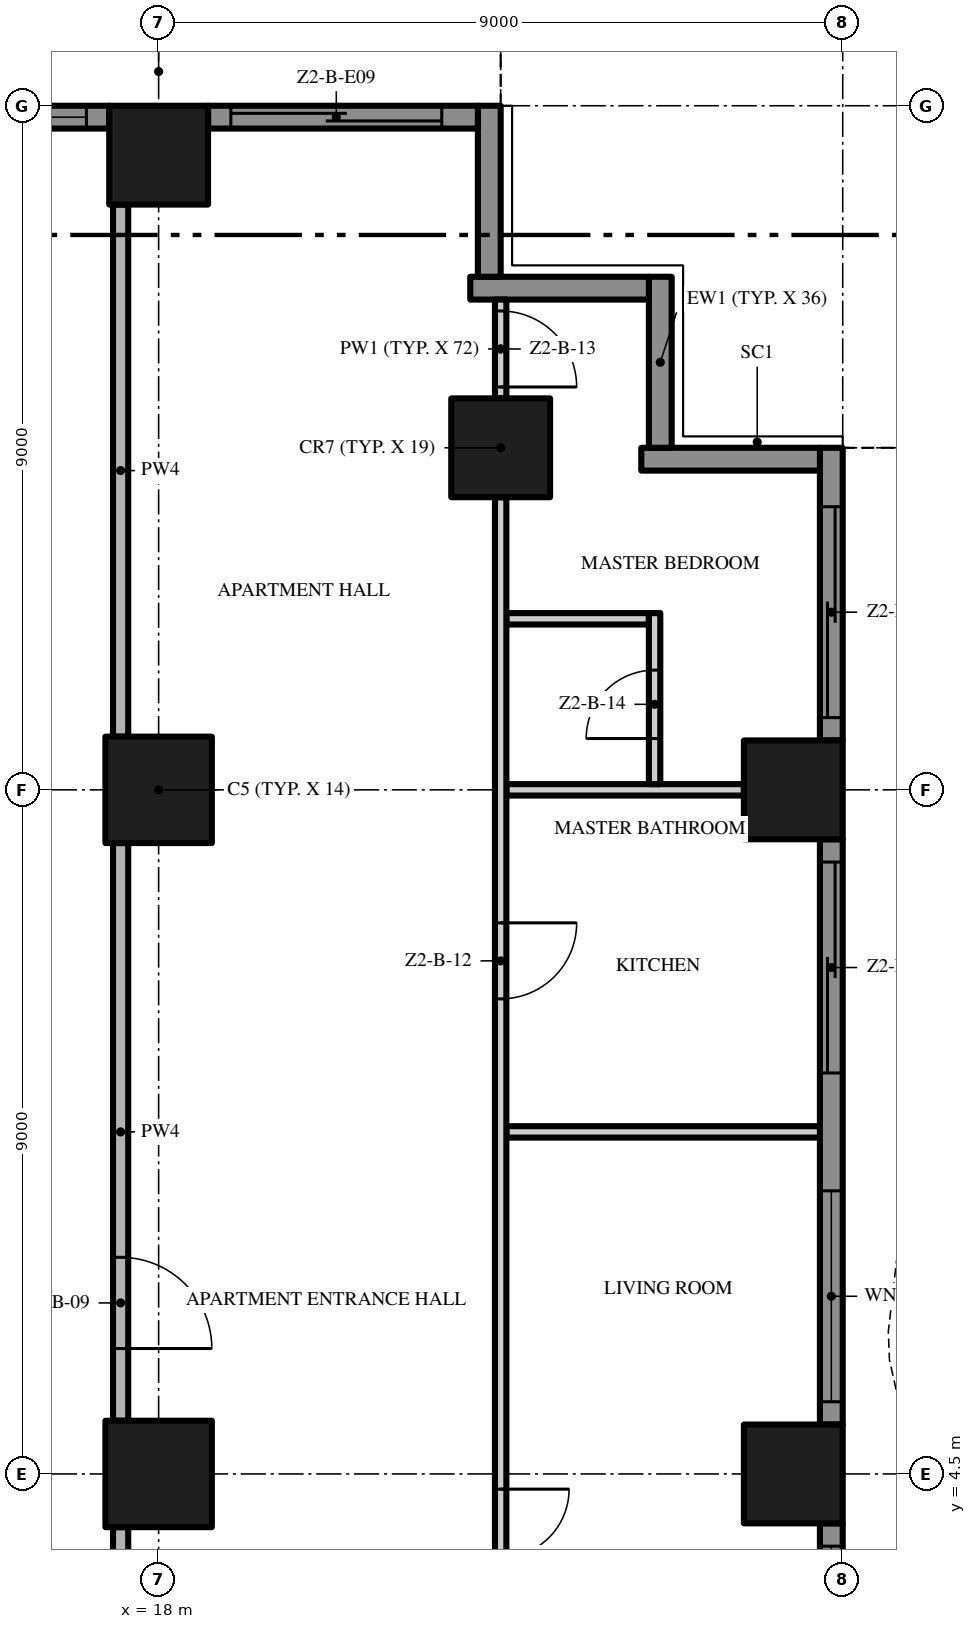
"""IFC4 building model, lengths in metres.
Left out: names, types, materials, properties, quantities, classifications, styles, units other than length and angle.
Written with IfcOpenShell. Run it as: python <this file> out.ifc"""

import sys

from ifc_helpers import new_model, si_unit, direction, frame, frame_2d, origin, origin_2d, place, context, subcontext, project, spatial, polyline, rectangle, outline, extrude, element, fill, save


model = new_model("IFC4")
c1 = context("Model", 3, precision=1e-05, world=origin(), true_north=direction((0.0, 1.0)))
c2 = subcontext(c1, "Body", "Model", "MODEL_VIEW")
j1 = project(units=[si_unit("LENGTHUNIT", "METRE"), si_unit("PLANEANGLEUNIT", "RADIAN")], contexts=[c1])
p1 = place(None, origin())
s1 = spatial("IfcSite", under=j1, at=p1, CompositionType="ELEMENT")
p2 = place(p1, origin())
s2 = spatial("IfcBuilding", under=s1, at=p2, CompositionType="ELEMENT")
p3 = place(p2, frame((0.0, 0.0, 80.8)))
s3 = spatial("IfcBuildingStorey", under=s2, at=p3, CompositionType="ELEMENT", Elevation=80.8)
p4 = place(p3, frame((18.0, 13.5, 0.0), z_axis=(0.0, 0.0, 1.0), x_axis=(1.0, 0.0, 0.0)))
e1 = element("IfcColumn", 1, at=p4, inside=s3, PredefinedType="COLUMN", context=c2, shape_type="SweptSolid", body=[
    extrude(rectangle(XDim=1.4, YDim=1.4, at=origin_2d()), origin(), (0.0, 0.0, 1.0), 3.5),
])
p5 = place(p3, frame((18.0, 21.85, 0.0), z_axis=(0.0, 0.0, 1.0), x_axis=(1.0, 0.0, 0.0)))
e2 = element("IfcColumn", 2, at=p5, inside=s3, PredefinedType="COLUMN", context=c2, shape_type="SweptSolid", body=[
    extrude(rectangle(XDim=1.3, YDim=1.3, at=origin_2d()), origin(), (0.0, 0.0, 1.0), 3.5),
])
p6 = place(p3, frame((18.0, 4.5, 0.0), z_axis=(0.0, 0.0, 1.0), x_axis=(1.0, 0.0, 0.0)))
e3 = element("IfcColumn", 3, at=p6, inside=s3, PredefinedType="COLUMN", context=c2, shape_type="SweptSolid", body=[
    extrude(rectangle(XDim=1.4, YDim=1.4, at=origin_2d()), origin(), (0.0, 0.0, 1.0), 3.5),
])
for number, where, z_axis, x_axis in (
    (4, (26.35, 13.5, 0.0), (0.0, 0.0, 1.0), (1.0, 0.0, 0.0)),
    (5, (22.5, 18.0, 0.0), (0.0, 0.0, 1.0), (1.0, 0.0, 0.0)),
    (6, (26.35, 4.5, 0.0), (0.0, 0.0, 1.0), (1.0, 0.0, 0.0)),
):
    element("IfcColumn", number, at=place(p3, frame(where, z_axis=z_axis, x_axis=x_axis)), inside=s3, PredefinedType="COLUMN", context=c2, shape_type="SweptSolid", body=[
        extrude(rectangle(XDim=1.3, YDim=1.3, at=origin_2d()), origin(), (0.0, 0.0, 1.0), 3.5),
    ])
p7 = place(p3, frame((26.85, 3.85, 0.0), z_axis=(0.0, 0.0, 1.0), x_axis=(0.0, -1.0, 0.0)))
e7 = element("IfcWall", 7, at=p7, inside=s3, PredefinedType="SOLIDWALL", context=c2, shape_type="SweptSolid", body=[
    extrude(rectangle(XDim=7.7, YDim=0.3, at=frame_2d((3.85, 0.0))), origin(), (0.0, 0.0, 1.0), 3.5),
])
p8 = place(p7, frame((4.625, 0.0, 0.0)))
e8 = element("IfcOpeningElement", 8, at=p8, cuts=e7, PredefinedType="OPENING", context=c2, shape_type="SweptSolid", body=[
    extrude(rectangle(XDim=2.775, YDim=2.4, at=frame_2d((1.387, 1.2))), frame((0.0, 0.16, 0.0), z_axis=(0.0, -1.0, 0.0), x_axis=(1.0, 0.0, 0.0)), (0.0, 0.0, 1.0), 0.32),
])
p9 = place(p7, frame((0.3, 0.0, 0.45)))
e9 = element("IfcOpeningElement", 9, at=p9, cuts=e7, PredefinedType="OPENING", context=c2, shape_type="SweptSolid", body=[
    extrude(rectangle(XDim=2.775, YDim=2.65, at=frame_2d((1.387, 1.325))), frame((0.0, 0.16, 0.0), z_axis=(0.0, -1.0, 0.0), x_axis=(1.0, 0.0, 0.0)), (0.0, 0.0, 1.0), 0.32),
])
p10 = place(p3, frame((26.85, 12.85, 0.0), z_axis=(0.0, 0.0, 1.0), x_axis=(0.0, -1.0, 0.0)))
e10 = element("IfcWall", 10, at=p10, inside=s3, PredefinedType="SOLIDWALL", context=c2, shape_type="SweptSolid", body=[
    extrude(rectangle(XDim=7.7, YDim=0.3, at=frame_2d((3.85, 0.0))), origin(), (0.0, 0.0, 1.0), 3.5),
])
p11 = place(p10, frame((4.625, 0.0, 0.45)))
e11 = element("IfcOpeningElement", 11, at=p11, cuts=e10, PredefinedType="OPENING", context=c2, shape_type="SweptSolid", body=[
    extrude(rectangle(XDim=2.775, YDim=2.65, at=frame_2d((1.387, 1.325))), frame((0.0, 0.16, 0.0), z_axis=(0.0, -1.0, 0.0), x_axis=(1.0, 0.0, 0.0)), (0.0, 0.0, 1.0), 0.32),
])
p12 = place(p10, frame((0.3, 0.0, 0.0)))
e12 = element("IfcOpeningElement", 12, at=p12, cuts=e10, PredefinedType="OPENING", context=c2, shape_type="SweptSolid", body=[
    extrude(rectangle(XDim=2.775, YDim=2.4, at=frame_2d((1.387, 1.2))), frame((0.0, 0.16, 0.0), z_axis=(0.0, -1.0, 0.0), x_axis=(1.0, 0.0, 0.0)), (0.0, 0.0, 1.0), 0.32),
])
p13 = place(p3, frame((26.85, 18.0, 0.0), z_axis=(0.0, 0.0, 1.0), x_axis=(0.0, -1.0, 0.0)))
e13 = element("IfcWall", 13, at=p13, inside=s3, PredefinedType="SOLIDWALL", context=c2, shape_type="SweptSolid", body=[
    extrude(rectangle(XDim=3.85, YDim=0.3, at=frame_2d((1.925, 0.0))), origin(), (0.0, 0.0, 1.0), 3.5),
])
p14 = place(p13, frame((0.775, 0.0, 0.0)))
e14 = element("IfcOpeningElement", 14, at=p14, cuts=e13, PredefinedType="OPENING", context=c2, shape_type="SweptSolid", body=[
    extrude(rectangle(XDim=2.775, YDim=2.4, at=frame_2d((1.387, 1.2))), frame((0.0, 0.16, 0.0), z_axis=(0.0, -1.0, 0.0), x_axis=(1.0, 0.0, 0.0)), (0.0, 0.0, 1.0), 0.32),
])
p15 = place(p3, frame((24.35, 17.85, 0.0), z_axis=(0.0, 0.0, 1.0), x_axis=(1.0, 0.0, 0.0)))
e15 = element("IfcWall", 15, at=p15, inside=s3, PredefinedType="SOLIDWALL", context=c2, shape_type="SweptSolid", body=[
    extrude(rectangle(XDim=2.35, YDim=0.3, at=frame_2d((1.175, 0.0))), origin(), (0.0, 0.0, 1.0), 3.5),
])
p16 = place(p3, frame((24.6, 20.25, 0.0), z_axis=(0.0, 0.0, 1.0), x_axis=(0.0, -1.0, 0.0)))
e16 = element("IfcWall", 16, at=p16, inside=s3, PredefinedType="SOLIDWALL", context=c2, shape_type="SweptSolid", body=[
    extrude(rectangle(XDim=2.25, YDim=0.3, at=frame_2d((1.125, 0.0))), origin(), (0.0, 0.0, 1.0), 3.5),
])
p17 = place(p3, frame((22.1, 20.1, 0.0), z_axis=(0.0, 0.0, 1.0), x_axis=(1.0, 0.0, 0.0)))
e17 = element("IfcWall", 17, at=p17, inside=s3, PredefinedType="SOLIDWALL", context=c2, shape_type="SweptSolid", body=[
    extrude(rectangle(XDim=2.35, YDim=0.3, at=frame_2d((1.175, 0.0))), origin(), (0.0, 0.0, 1.0), 3.5),
])
p18 = place(p3, frame((22.35, 22.5, 0.0), z_axis=(0.0, 0.0, 1.0), x_axis=(0.0, -1.0, 0.0)))
e18 = element("IfcWall", 18, at=p18, inside=s3, PredefinedType="SOLIDWALL", context=c2, shape_type="SweptSolid", body=[
    extrude(rectangle(XDim=2.25, YDim=0.3, at=frame_2d((1.125, 0.0))), origin(), (0.0, 0.0, 1.0), 3.5),
])
p19 = place(p3, frame((18.65, 22.35, 0.0), z_axis=(0.0, 0.0, 1.0), x_axis=(1.0, 0.0, 0.0)))
e19 = element("IfcWall", 19, at=p19, inside=s3, PredefinedType="SOLIDWALL", context=c2, shape_type="SweptSolid", body=[
    extrude(rectangle(XDim=3.55, YDim=0.3, at=frame_2d((1.775, 0.0))), origin(), (0.0, 0.0, 1.0), 3.5),
])
p20 = place(p19, frame((0.3, 0.0, 0.0)))
e20 = element("IfcOpeningElement", 20, at=p20, cuts=e19, PredefinedType="OPENING", context=c2, shape_type="SweptSolid", body=[
    extrude(rectangle(XDim=2.775, YDim=2.4, at=frame_2d((1.387, 1.2))), frame((0.0, 0.16, 0.0), z_axis=(0.0, -1.0, 0.0), x_axis=(1.0, 0.0, 0.0)), (0.0, 0.0, 1.0), 0.32),
])
p21 = place(p3, frame((13.5, 22.35, 0.0), z_axis=(0.0, 0.0, 1.0), x_axis=(1.0, 0.0, 0.0)))
e21 = element("IfcWall", 21, at=p21, inside=s3, PredefinedType="SOLIDWALL", context=c2, shape_type="SweptSolid", body=[
    extrude(rectangle(XDim=3.85, YDim=0.3, at=frame_2d((1.925, 0.0))), origin(), (0.0, 0.0, 1.0), 3.5),
])
p22 = place(p21, frame((0.775, 0.0, 0.45)))
e22 = element("IfcOpeningElement", 22, at=p22, cuts=e21, PredefinedType="OPENING", context=c2, shape_type="SweptSolid", body=[
    extrude(rectangle(XDim=2.775, YDim=2.65, at=frame_2d((1.387, 1.325))), frame((0.0, 0.16, 0.0), z_axis=(0.0, -1.0, 0.0), x_axis=(1.0, 0.0, 0.0)), (0.0, 0.0, 1.0), 0.32),
])
p23 = place(p3, origin())
e23 = element("IfcWall", 23, at=p23, inside=s3, PredefinedType="USERDEFINED", context=c2, shape_type="SweptSolid", body=[
    extrude(outline(polyline([(29.649, -18.0), (29.985, -16.5), (30.0, -16.125), (29.869, -15.0), (29.345, -13.5), (28.612, -12.0), (27.951, -10.5), (27.615, -9.0), (27.6, -8.625), (27.731, -7.5), (28.255, -6.0), (28.988, -4.5), (29.649, -3.0), (29.985, -1.5), (30.0, -1.125), (29.869, 0.0), (29.345, 1.5), (28.612, 3.0), (27.951, 4.5), (27.615, 6.0), (27.6, 6.375), (27.731, 7.5), (28.255, 9.0), (28.988, 10.5), (29.649, 12.0), (29.985, 13.5), (30.0, 13.875), (29.869, 15.0), (29.345, 16.5), (28.612, 18.0), (28.388, 17.89), (29.114, 16.404), (29.624, 14.944), (29.749, 13.865), (29.736, 13.533), (29.41, 12.079), (28.761, 10.605), (28.024, 9.096), (27.486, 7.556), (27.349, 6.385), (27.366, 5.967), (27.713, 4.421), (28.385, 2.895), (29.114, 1.404), (29.624, -0.056), (29.749, -1.135), (29.736, -1.467), (29.41, -2.921), (28.761, -4.395), (28.024, -5.904), (27.486, -7.444), (27.349, -8.615), (27.366, -9.033), (27.713, -10.579), (28.385, -12.105), (29.114, -13.596), (29.624, -15.056), (29.749, -16.135), (29.736, -16.467), (29.405, -17.945), (29.649, -18.0)])), origin(), (0.0, 0.0, 1.0), 0.9),
])
p24 = place(p3, origin())
e24 = element("IfcWall", 24, at=p24, inside=s3, PredefinedType="USERDEFINED", context=c2, shape_type="SweptSolid", body=[
    extrude(outline(polyline([(22.5, 25.149), (21.0, 25.485), (20.625, 25.5), (19.5, 25.369), (18.0, 24.845), (16.5, 24.112), (15.0, 23.451), (13.5, 23.115), (13.555, 22.871), (15.079, 23.213), (16.605, 23.885), (18.096, 24.614), (19.556, 25.124), (20.635, 25.249), (20.967, 25.236), (22.445, 24.905), (22.5, 25.149)])), origin(), (0.0, 0.0, 1.0), 0.9),
])
p25 = place(p3, frame((22.575, 9.0, 0.0), z_axis=(0.0, 0.0, 1.0), x_axis=(1.0, 0.0, 0.0)))
e25 = element("IfcWall", 25, at=p25, inside=s3, PredefinedType="PARTITIONING", context=c2, shape_type="SweptSolid", body=[
    extrude(rectangle(XDim=4.125, YDim=0.15, at=frame_2d((2.062, 0.0))), origin(), (0.0, 0.0, 1.0), 3.5),
])
p26 = place(p3, frame((22.575, 13.5, 0.0), z_axis=(0.0, 0.0, 1.0), x_axis=(1.0, 0.0, 0.0)))
e26 = element("IfcWall", 26, at=p26, inside=s3, PredefinedType="PARTITIONING", context=c2, shape_type="SweptSolid", body=[
    extrude(rectangle(XDim=3.125, YDim=0.15, at=frame_2d((1.562, 0.0))), origin(), (0.0, 0.0, 1.0), 3.5),
])
p27 = place(p3, frame((22.575, 15.75, 0.0), z_axis=(0.0, 0.0, 1.0), x_axis=(1.0, 0.0, 0.0)))
e27 = element("IfcWall", 27, at=p27, inside=s3, PredefinedType="PARTITIONING", context=c2, shape_type="SweptSolid", body=[
    extrude(rectangle(XDim=1.875, YDim=0.15, at=frame_2d((0.938, 0.0))), origin(), (0.0, 0.0, 1.0), 3.5),
])
p28 = place(p3, frame((17.5, -0.2, 0.0), z_axis=(0.0, 0.0, 1.0), x_axis=(0.0, 1.0, 0.0)))
e28 = element("IfcWall", 28, at=p28, inside=s3, PredefinedType="PARTITIONING", context=c2, shape_type="SweptSolid", body=[
    extrude(rectangle(XDim=4.0, YDim=0.2, at=frame_2d((2.0, 0.0))), origin(), (0.0, 0.0, 1.0), 3.5),
])
p29 = place(p3, frame((17.5, 12.8, 0.0), z_axis=(0.0, 0.0, 1.0), x_axis=(0.0, -1.0, 0.0)))
e29 = element("IfcWall", 29, at=p29, inside=s3, PredefinedType="PARTITIONING", context=c2, shape_type="SweptSolid", body=[
    extrude(rectangle(XDim=7.6, YDim=0.2, at=frame_2d((3.8, 0.0))), origin(), (0.0, 0.0, 1.0), 3.5),
])
p30 = place(p29, frame((5.45, 0.0, 0.0)))
e30 = element("IfcOpeningElement", 30, at=p30, cuts=e29, PredefinedType="OPENING", context=c2, shape_type="SweptSolid", body=[
    extrude(rectangle(XDim=1.2, YDim=2.4, at=frame_2d((0.6, 1.2))), frame((0.0, 0.11, 0.0), z_axis=(0.0, -1.0, 0.0), x_axis=(1.0, 0.0, 0.0)), (0.0, 0.0, 1.0), 0.22),
])
p31 = place(p3, frame((17.5, 14.2, 0.0), z_axis=(0.0, 0.0, 1.0), x_axis=(0.0, 1.0, 0.0)))
e31 = element("IfcWall", 31, at=p31, inside=s3, PredefinedType="PARTITIONING", context=c2, shape_type="SweptSolid", body=[
    extrude(rectangle(XDim=7.0, YDim=0.2, at=frame_2d((3.5, 0.0))), origin(), (0.0, 0.0, 1.0), 3.5),
])
p32 = place(p3, frame((22.5, 17.35, 0.0), z_axis=(0.0, 0.0, 1.0), x_axis=(0.0, -1.0, 0.0)))
e32 = element("IfcWall", 32, at=p32, inside=s3, PredefinedType="PARTITIONING", context=c2, shape_type="SweptSolid", body=[
    extrude(rectangle(XDim=17.25, YDim=0.15, at=frame_2d((8.625, 0.0))), origin(), (0.0, 0.0, 1.0), 3.5),
])
p33 = place(p32, frame((13.05, 0.0, 0.0)))
e33 = element("IfcOpeningElement", 33, at=p33, cuts=e32, PredefinedType="OPENING", context=c2, shape_type="SweptSolid", body=[
    extrude(rectangle(XDim=1.8, YDim=2.4, at=frame_2d((0.9, 1.2))), frame((0.0, 0.085, 0.0), z_axis=(0.0, -1.0, 0.0), x_axis=(1.0, 0.0, 0.0)), (0.0, 0.0, 1.0), 0.17),
])
p34 = place(p32, frame((5.6, 0.0, 0.0)))
e34 = element("IfcOpeningElement", 34, at=p34, cuts=e32, PredefinedType="OPENING", context=c2, shape_type="SweptSolid", body=[
    extrude(rectangle(XDim=1.0, YDim=2.4, at=frame_2d((0.5, 1.2))), frame((0.0, 0.085, 0.0), z_axis=(0.0, -1.0, 0.0), x_axis=(1.0, 0.0, 0.0)), (0.0, 0.0, 1.0), 0.17),
])
p35 = place(p3, frame((22.5, 19.95, 0.0), z_axis=(0.0, 0.0, 1.0), x_axis=(0.0, -1.0, 0.0)))
e35 = element("IfcWall", 35, at=p35, inside=s3, PredefinedType="PARTITIONING", context=c2, shape_type="SweptSolid", body=[
    extrude(rectangle(XDim=1.3, YDim=0.15, at=frame_2d((0.65, 0.0))), origin(), (0.0, 0.0, 1.0), 3.5),
])
p36 = place(p35, frame((0.15, 0.0, 0.0)))
e36 = element("IfcOpeningElement", 36, at=p36, cuts=e35, PredefinedType="OPENING", context=c2, shape_type="SweptSolid", body=[
    extrude(rectangle(XDim=1.0, YDim=2.4, at=frame_2d((0.5, 1.2))), frame((0.0, 0.085, 0.0), z_axis=(0.0, -1.0, 0.0), x_axis=(1.0, 0.0, 0.0)), (0.0, 0.0, 1.0), 0.17),
])
p37 = place(p3, frame((24.525, 13.575, 0.0), z_axis=(0.0, 0.0, 1.0), x_axis=(0.0, 1.0, 0.0)))
e37 = element("IfcWall", 37, at=p37, inside=s3, PredefinedType="PARTITIONING", context=c2, shape_type="SweptSolid", body=[
    extrude(rectangle(XDim=2.25, YDim=0.15, at=frame_2d((1.125, 0.0))), origin(), (0.0, 0.0, 1.0), 3.5),
])
p38 = place(p37, frame((0.6, 0.0, 0.0)))
e38 = element("IfcOpeningElement", 38, at=p38, cuts=e37, PredefinedType="OPENING", context=c2, shape_type="SweptSolid", body=[
    extrude(rectangle(XDim=0.9, YDim=2.1, at=frame_2d((0.45, 1.05))), frame((0.0, 0.085, 0.0), z_axis=(0.0, -1.0, 0.0), x_axis=(1.0, 0.0, 0.0)), (0.0, 0.0, 1.0), 0.17),
])
p39 = place(p9, origin())
e39 = element("IfcWindow", 39, at=p39, inside=s3, PartitioningType="SINGLE_PANEL", PredefinedType="WINDOW", context=c2, shape_type="SweptSolid", body=[
    extrude(rectangle(XDim=2.775, YDim=2.65, at=frame_2d((1.387, 1.325))), frame((0.0, 0.03, 0.0), z_axis=(0.0, -1.0, 0.0), x_axis=(1.0, 0.0, 0.0)), (0.0, 0.0, 1.0), 0.06),
])
fill(e9, e39)
p40 = place(p11, origin())
e40 = element("IfcWindow", 40, at=p40, inside=s3, PartitioningType="SINGLE_PANEL", PredefinedType="WINDOW", context=c2, shape_type="SweptSolid", body=[
    extrude(rectangle(XDim=2.775, YDim=2.65, at=frame_2d((1.387, 1.325))), frame((0.0, 0.03, 0.0), z_axis=(0.0, -1.0, 0.0), x_axis=(1.0, 0.0, 0.0)), (0.0, 0.0, 1.0), 0.06),
])
fill(e11, e40)
p41 = place(p12, origin())
e41 = element("IfcDoor", 41, at=p41, inside=s3, OperationType="SINGLE_SWING_LEFT", PredefinedType="DOOR", context=c2, shape_type="SweptSolid", body=[
    extrude(rectangle(XDim=2.775, YDim=2.4, at=frame_2d((1.387, 1.2))), frame((0.0, 0.025, 0.0), z_axis=(0.0, -1.0, 0.0), x_axis=(1.0, 0.0, 0.0)), (0.0, 0.0, 1.0), 0.05),
])
fill(e12, e41)
p42 = place(p14, origin())
e42 = element("IfcDoor", 42, at=p42, inside=s3, OperationType="SINGLE_SWING_LEFT", PredefinedType="DOOR", context=c2, shape_type="SweptSolid", body=[
    extrude(rectangle(XDim=2.775, YDim=2.4, at=frame_2d((1.387, 1.2))), frame((0.0, 0.025, 0.0), z_axis=(0.0, -1.0, 0.0), x_axis=(1.0, 0.0, 0.0)), (0.0, 0.0, 1.0), 0.05),
])
fill(e14, e42)
p43 = place(p20, origin())
e43 = element("IfcDoor", 43, at=p43, inside=s3, OperationType="SINGLE_SWING_LEFT", PredefinedType="DOOR", context=c2, shape_type="SweptSolid", body=[
    extrude(rectangle(XDim=2.775, YDim=2.4, at=frame_2d((1.387, 1.2))), frame((0.0, 0.025, 0.0), z_axis=(0.0, -1.0, 0.0), x_axis=(1.0, 0.0, 0.0)), (0.0, 0.0, 1.0), 0.05),
])
fill(e20, e43)
p44 = place(p22, origin())
e44 = element("IfcWindow", 44, at=p44, inside=s3, PartitioningType="SINGLE_PANEL", PredefinedType="WINDOW", context=c2, shape_type="SweptSolid", body=[
    extrude(rectangle(XDim=2.775, YDim=2.65, at=frame_2d((1.387, 1.325))), frame((0.0, 0.03, 0.0), z_axis=(0.0, -1.0, 0.0), x_axis=(1.0, 0.0, 0.0)), (0.0, 0.0, 1.0), 0.06),
])
fill(e22, e44)
p45 = place(p30, origin())
e45 = element("IfcDoor", 45, at=p45, inside=s3, OperationType="SINGLE_SWING_RIGHT", PredefinedType="DOOR", context=c2, shape_type="SweptSolid", body=[
    extrude(rectangle(XDim=1.2, YDim=2.4, at=frame_2d((0.6, 1.2))), frame((0.0, 0.025, 0.0), z_axis=(0.0, -1.0, 0.0), x_axis=(1.0, 0.0, 0.0)), (0.0, 0.0, 1.0), 0.05),
])
fill(e30, e45)
p46 = place(p33, origin())
e46 = element("IfcDoor", 46, at=p46, inside=s3, OperationType="DOUBLE_DOOR_SINGLE_SWING", PredefinedType="DOOR", context=c2, shape_type="SweptSolid", body=[
    extrude(rectangle(XDim=1.8, YDim=2.4, at=frame_2d((0.9, 1.2))), frame((0.0, 0.025, 0.0), z_axis=(0.0, -1.0, 0.0), x_axis=(1.0, 0.0, 0.0)), (0.0, 0.0, 1.0), 0.05),
])
fill(e33, e46)
p47 = place(p34, origin())
e47 = element("IfcDoor", 47, at=p47, inside=s3, OperationType="SINGLE_SWING_LEFT", PredefinedType="DOOR", context=c2, shape_type="SweptSolid", body=[
    extrude(rectangle(XDim=1.0, YDim=2.4, at=frame_2d((0.5, 1.2))), frame((0.0, 0.025, 0.0), z_axis=(0.0, -1.0, 0.0), x_axis=(1.0, 0.0, 0.0)), (0.0, 0.0, 1.0), 0.05),
])
fill(e34, e47)
p48 = place(p36, origin())
e48 = element("IfcDoor", 48, at=p48, inside=s3, OperationType="SINGLE_SWING_RIGHT", PredefinedType="DOOR", context=c2, shape_type="SweptSolid", body=[
    extrude(rectangle(XDim=1.0, YDim=2.4, at=frame_2d((0.5, 1.2))), frame((0.0, 0.025, 0.0), z_axis=(0.0, -1.0, 0.0), x_axis=(1.0, 0.0, 0.0)), (0.0, 0.0, 1.0), 0.05),
])
fill(e36, e48)
p49 = place(p38, origin())
e49 = element("IfcDoor", 49, at=p49, inside=s3, OperationType="SINGLE_SWING_LEFT", PredefinedType="DOOR", context=c2, shape_type="SweptSolid", body=[
    extrude(rectangle(XDim=0.9, YDim=2.1, at=frame_2d((0.45, 1.05))), frame((0.0, 0.025, 0.0), z_axis=(0.0, -1.0, 0.0), x_axis=(1.0, 0.0, 0.0)), (0.0, 0.0, 1.0), 0.05),
])
fill(e38, e49)
save(model, sys.argv[1])
